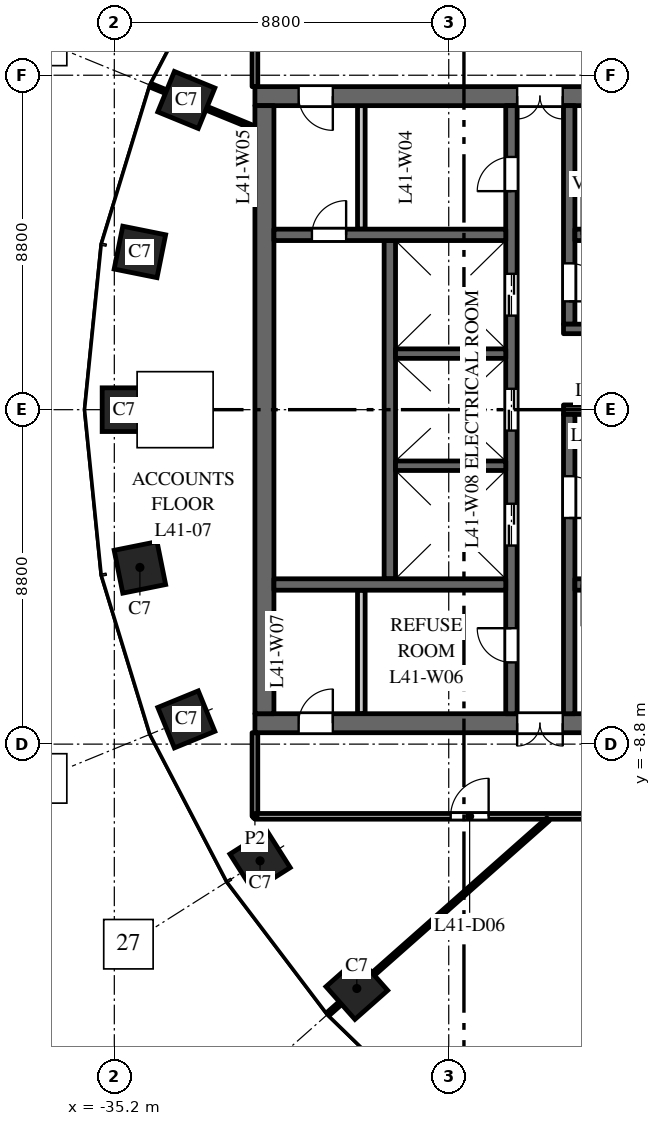
"""IFC4 building model, lengths in metres.
Left out: names, types, materials, properties, quantities, classifications, styles, units other than length and angle.
Written with IfcOpenShell. Run it as: python <this file> out.ifc"""

import sys

from ifc_helpers import new_model, si_unit, direction, frame, frame_2d, origin, origin_2d, place, context, subcontext, project, spatial, rectangle, extrude, element, fill, save


model = new_model("IFC4")
c1 = context("Model", 3, precision=1e-05, world=origin(), true_north=direction((0.0, 1.0)))
c2 = subcontext(c1, "Body", "Model", "MODEL_VIEW")
j1 = project(units=[si_unit("LENGTHUNIT", "METRE"), si_unit("PLANEANGLEUNIT", "RADIAN")], contexts=[c1])
p1 = place(None, origin())
s1 = spatial("IfcSite", under=j1, at=p1, CompositionType="ELEMENT")
p2 = place(p1, origin())
s2 = spatial("IfcBuilding", under=s1, at=p2, CompositionType="ELEMENT")
p3 = place(p2, frame((0.0, 0.0, 178.0)))
s3 = spatial("IfcBuildingStorey", under=s2, at=p3, CompositionType="ELEMENT", Elevation=178.0)
for number, where, z_axis, x_axis in (
    (1, (-33.305, 8.149, 0.0), (0.0, 0.0, 1.0), (-0.379, -0.925, 0.0)),
    (2, (-34.527, 4.151, 0.0), (0.0, 0.0, 1.0), (-0.197, -0.98, 0.0)),
    (3, (-34.945, 0.0, 0.0), (0.0, 0.0, 1.0), (0.0, -1.0, 0.0)),
    (4, (-34.527, -4.151, 0.0), (0.0, 0.0, 1.0), (0.197, -0.98, 0.0)),
    (5, (-33.305, -8.149, 0.0), (0.0, 0.0, 1.0), (0.379, -0.925, 0.0)),
    (6, (-31.365, -11.871, 0.0), (0.0, 0.0, 1.0), (0.535, -0.845, 0.0)),
    (7, (-28.819, -15.23, 0.0), (0.0, 0.0, 1.0), (0.663, -0.749, 0.0)),
):
    element("IfcColumn", number, at=place(p3, frame(where, z_axis=z_axis, x_axis=x_axis)), inside=s3, PredefinedType="COLUMN", context=c2, shape_type="SweptSolid", body=[
        extrude(rectangle(XDim=1.15, YDim=1.15, at=origin_2d()), origin(), (0.0, 0.0, 1.0), 4.0),
    ])
p4 = place(p3, frame((-16.5, 8.25, 0.0), z_axis=(0.0, 0.0, 1.0), x_axis=(-1.0, 0.0, 0.0)))
e8 = element("IfcWall", 8, at=p4, inside=s3, PredefinedType="SHEAR", context=c2, shape_type="SweptSolid", body=[
    extrude(rectangle(XDim=15.0, YDim=0.5, at=frame_2d((7.5, 0.0))), origin(), (0.0, 0.0, 1.0), 3.7),
])
p5 = place(p4, frame((6.9, 0.0, 0.0)))
e9 = element("IfcOpeningElement", 9, at=p5, cuts=e8, PredefinedType="OPENING", context=c2, shape_type="SweptSolid", body=[
    extrude(rectangle(XDim=1.2, YDim=2.1, at=frame_2d((0.6, 1.05))), frame((0.0, 0.26, 0.0), z_axis=(0.0, -1.0, 0.0), x_axis=(1.0, 0.0, 0.0)), (0.0, 0.0, 1.0), 0.52),
])
p6 = place(p4, frame((12.95, 0.0, 0.0)))
e10 = element("IfcOpeningElement", 10, at=p6, cuts=e8, PredefinedType="OPENING", context=c2, shape_type="SweptSolid", body=[
    extrude(rectangle(XDim=0.9, YDim=2.1, at=frame_2d((0.45, 1.05))), frame((0.0, 0.26, 0.0), z_axis=(0.0, -1.0, 0.0), x_axis=(1.0, 0.0, 0.0)), (0.0, 0.0, 1.0), 0.52),
])
p7 = place(p3, frame((-16.5, -8.25, 0.0), z_axis=(0.0, 0.0, 1.0), x_axis=(-1.0, 0.0, 0.0)))
e11 = element("IfcWall", 11, at=p7, inside=s3, PredefinedType="SHEAR", context=c2, shape_type="SweptSolid", body=[
    extrude(rectangle(XDim=15.0, YDim=0.5, at=frame_2d((7.5, 0.0))), origin(), (0.0, 0.0, 1.0), 3.7),
])
p8 = place(p7, frame((6.9, 0.0, 0.0)))
e12 = element("IfcOpeningElement", 12, at=p8, cuts=e11, PredefinedType="OPENING", context=c2, shape_type="SweptSolid", body=[
    extrude(rectangle(XDim=1.2, YDim=2.1, at=frame_2d((0.6, 1.05))), frame((0.0, 0.26, 0.0), z_axis=(0.0, -1.0, 0.0), x_axis=(1.0, 0.0, 0.0)), (0.0, 0.0, 1.0), 0.52),
])
p9 = place(p7, frame((12.95, 0.0, 0.0)))
e13 = element("IfcOpeningElement", 13, at=p9, cuts=e11, PredefinedType="OPENING", context=c2, shape_type="SweptSolid", body=[
    extrude(rectangle(XDim=0.9, YDim=2.1, at=frame_2d((0.45, 1.05))), frame((0.0, 0.26, 0.0), z_axis=(0.0, -1.0, 0.0), x_axis=(1.0, 0.0, 0.0)), (0.0, 0.0, 1.0), 0.52),
])
p10 = place(p3, frame((-27.95, -4.45, 0.0), z_axis=(0.0, 0.0, 1.0), x_axis=(0.0, 1.0, 0.0)))
e14 = element("IfcWall", 14, at=p10, inside=s3, PredefinedType="SHEAR", context=c2, shape_type="SweptSolid", body=[
    extrude(rectangle(XDim=8.9, YDim=0.3, at=frame_2d((4.45, 0.0))), origin(), (0.0, 0.0, 1.0), 3.7),
])
p11 = place(p3, frame((-24.75, -8.0, 0.0), z_axis=(0.0, 0.0, 1.0), x_axis=(0.0, 1.0, 0.0)))
e15 = element("IfcWall", 15, at=p11, inside=s3, PredefinedType="SHEAR", context=c2, shape_type="SweptSolid", body=[
    extrude(rectangle(XDim=16.0, YDim=0.3, at=frame_2d((8.0, 0.0))), origin(), (0.0, 0.0, 1.0), 3.7),
])
p12 = place(p11, frame((4.425, 0.0, 0.0)))
e16 = element("IfcOpeningElement", 16, at=p12, cuts=e15, PredefinedType="OPENING", context=c2, shape_type="SweptSolid", body=[
    extrude(rectangle(XDim=1.1, YDim=2.1, at=frame_2d((0.55, 1.05))), frame((0.0, 0.16, 0.0), z_axis=(0.0, -1.0, 0.0), x_axis=(1.0, 0.0, 0.0)), (0.0, 0.0, 1.0), 0.32),
])
p13 = place(p11, frame((7.45, 0.0, 0.0)))
e17 = element("IfcOpeningElement", 17, at=p13, cuts=e15, PredefinedType="OPENING", context=c2, shape_type="SweptSolid", body=[
    extrude(rectangle(XDim=1.1, YDim=2.1, at=frame_2d((0.55, 1.05))), frame((0.0, 0.16, 0.0), z_axis=(0.0, -1.0, 0.0), x_axis=(1.0, 0.0, 0.0)), (0.0, 0.0, 1.0), 0.32),
])
p14 = place(p11, frame((10.475, 0.0, 0.0)))
e18 = element("IfcOpeningElement", 18, at=p14, cuts=e15, PredefinedType="OPENING", context=c2, shape_type="SweptSolid", body=[
    extrude(rectangle(XDim=1.1, YDim=2.1, at=frame_2d((0.55, 1.05))), frame((0.0, 0.16, 0.0), z_axis=(0.0, -1.0, 0.0), x_axis=(1.0, 0.0, 0.0)), (0.0, 0.0, 1.0), 0.32),
])
p15 = place(p11, frame((13.75, 0.0, 0.0)))
e19 = element("IfcOpeningElement", 19, at=p15, cuts=e15, PredefinedType="OPENING", context=c2, shape_type="SweptSolid", body=[
    extrude(rectangle(XDim=0.9, YDim=2.1, at=frame_2d((0.45, 1.05))), frame((0.0, 0.16, 0.0), z_axis=(0.0, -1.0, 0.0), x_axis=(1.0, 0.0, 0.0)), (0.0, 0.0, 1.0), 0.32),
])
p16 = place(p11, frame((1.35, 0.0, 0.0)))
e20 = element("IfcOpeningElement", 20, at=p16, cuts=e15, PredefinedType="OPENING", context=c2, shape_type="SweptSolid", body=[
    extrude(rectangle(XDim=0.9, YDim=2.1, at=frame_2d((0.45, 1.05))), frame((0.0, 0.16, 0.0), z_axis=(0.0, -1.0, 0.0), x_axis=(1.0, 0.0, 0.0)), (0.0, 0.0, 1.0), 0.32),
])
p17 = place(p3, frame((-20.1, 0.0, 0.0), z_axis=(0.0, 0.0, 1.0), x_axis=(-1.0, 0.0, 0.0)))
e21 = element("IfcWall", 21, at=p17, inside=s3, PredefinedType="SHEAR", context=c2, shape_type="SweptSolid", body=[
    extrude(rectangle(XDim=3.28, YDim=0.25, at=frame_2d((1.64, 0.0))), origin(), (0.0, 0.0, 1.0), 3.7),
])
p18 = place(p3, frame((-31.25, -8.0, 0.0), z_axis=(0.0, 0.0, 1.0), x_axis=(0.0, 1.0, 0.0)))
e22 = element("IfcWall", 22, at=p18, inside=s3, PredefinedType="SHEAR", context=c2, shape_type="SweptSolid", body=[
    extrude(rectangle(XDim=16.0, YDim=0.5, at=frame_2d((8.0, 0.0))), origin(), (0.0, 0.0, 1.0), 3.7),
])
p19 = place(p3, frame((-24.9, 4.6, 0.0), z_axis=(0.0, 0.0, 1.0), x_axis=(-1.0, 0.0, 0.0)))
e23 = element("IfcWall", 23, at=p19, inside=s3, PredefinedType="SHEAR", context=c2, shape_type="SweptSolid", body=[
    extrude(rectangle(XDim=6.1, YDim=0.3, at=frame_2d((3.05, 0.0))), origin(), (0.0, 0.0, 1.0), 3.7),
])
p20 = place(p19, frame((4.2, 0.0, 0.0)))
e24 = element("IfcOpeningElement", 24, at=p20, cuts=e23, PredefinedType="OPENING", context=c2, shape_type="SweptSolid", body=[
    extrude(rectangle(XDim=0.9, YDim=2.1, at=frame_2d((0.45, 1.05))), frame((0.0, 0.16, 0.0), z_axis=(0.0, -1.0, 0.0), x_axis=(1.0, 0.0, 0.0)), (0.0, 0.0, 1.0), 0.32),
])
for number, where, z_axis, x_axis in (
    (25, (-28.7, 4.75, 0.0), (0.0, 0.0, 1.0), (0.0, 1.0, 0.0)),
    (26, (-28.7, -8.0, 0.0), (0.0, 0.0, 1.0), (0.0, 1.0, 0.0)),
):
    element("IfcWall", number, at=place(p3, frame(where, z_axis=z_axis, x_axis=x_axis)), inside=s3, PredefinedType="PARTITIONING", context=c2, shape_type="SweptSolid", body=[
        extrude(rectangle(XDim=3.25, YDim=0.2, at=frame_2d((1.625, 0.0))), origin(), (0.0, 0.0, 1.0), 3.7),
    ])
p21 = place(p3, frame((-24.9, -4.6, 0.0), z_axis=(0.0, 0.0, 1.0), x_axis=(-1.0, 0.0, 0.0)))
e27 = element("IfcWall", 27, at=p21, inside=s3, PredefinedType="SHEAR", context=c2, shape_type="SweptSolid", body=[
    extrude(rectangle(XDim=6.1, YDim=0.3, at=frame_2d((3.05, 0.0))), origin(), (0.0, 0.0, 1.0), 3.7),
])
for number, where, z_axis, x_axis in (
    (28, (-24.9, -1.475, 0.0), (0.0, 0.0, 1.0), (-1.0, 0.0, 0.0)),
    (29, (-24.9, 1.475, 0.0), (0.0, 0.0, 1.0), (-1.0, 0.0, 0.0)),
):
    element("IfcWall", number, at=place(p3, frame(where, z_axis=z_axis, x_axis=x_axis)), inside=s3, PredefinedType="SHEAR", context=c2, shape_type="SweptSolid", body=[
        extrude(rectangle(XDim=2.9, YDim=0.25, at=frame_2d((1.45, 0.0))), origin(), (0.0, 0.0, 1.0), 3.7),
    ])
p22 = place(p3, frame((-23.23, 2.25, 0.0), z_axis=(0.0, 0.0, 1.0), x_axis=(0.0, 1.0, 0.0)))
e30 = element("IfcWall", 30, at=p22, inside=s3, PredefinedType="SHEAR", context=c2, shape_type="SweptSolid", body=[
    extrude(rectangle(XDim=5.75, YDim=0.3, at=frame_2d((2.875, 0.0))), origin(), (0.0, 0.0, 1.0), 3.7),
])
p23 = place(p22, frame((0.6, 0.0, 0.0)))
e31 = element("IfcOpeningElement", 31, at=p23, cuts=e30, PredefinedType="OPENING", context=c2, shape_type="SweptSolid", body=[
    extrude(rectangle(XDim=1.0, YDim=2.1, at=frame_2d((0.5, 1.05))), frame((0.0, 0.16, 0.0), z_axis=(0.0, -1.0, 0.0), x_axis=(1.0, 0.0, 0.0)), (0.0, 0.0, 1.0), 0.32),
])
p24 = place(p3, frame((-23.23, -8.0, 0.0), z_axis=(0.0, 0.0, 1.0), x_axis=(0.0, 1.0, 0.0)))
e32 = element("IfcWall", 32, at=p24, inside=s3, PredefinedType="SHEAR", context=c2, shape_type="SweptSolid", body=[
    extrude(rectangle(XDim=7.875, YDim=0.3, at=frame_2d((3.938, 0.0))), origin(), (0.0, 0.0, 1.0), 3.7),
])
p25 = place(p24, frame((5.15, 0.0, 0.0)))
e33 = element("IfcOpeningElement", 33, at=p25, cuts=e32, PredefinedType="OPENING", context=c2, shape_type="SweptSolid", body=[
    extrude(rectangle(XDim=1.1, YDim=2.1, at=frame_2d((0.55, 1.05))), frame((0.0, 0.16, 0.0), z_axis=(0.0, -1.0, 0.0), x_axis=(1.0, 0.0, 0.0)), (0.0, 0.0, 1.0), 0.32),
])
p26 = place(p3, frame((-16.9, 4.6, 0.0), z_axis=(0.0, 0.0, 1.0), x_axis=(-1.0, 0.0, 0.0)))
e34 = element("IfcWall", 34, at=p26, inside=s3, PredefinedType="SHEAR", context=c2, shape_type="SweptSolid", body=[
    extrude(rectangle(XDim=6.18, YDim=0.3, at=frame_2d((3.09, 0.0))), origin(), (0.0, 0.0, 1.0), 3.7),
])
p27 = place(p26, frame((4.9, 0.0, 0.0)))
e35 = element("IfcOpeningElement", 35, at=p27, cuts=e34, PredefinedType="OPENING", context=c2, shape_type="SweptSolid", body=[
    extrude(rectangle(XDim=1.1, YDim=2.1, at=frame_2d((0.55, 1.05))), frame((0.0, 0.16, 0.0), z_axis=(0.0, -1.0, 0.0), x_axis=(1.0, 0.0, 0.0)), (0.0, 0.0, 1.0), 0.32),
])
p28 = place(p3, frame((-16.9, -4.6, 0.0), z_axis=(0.0, 0.0, 1.0), x_axis=(-1.0, 0.0, 0.0)))
e36 = element("IfcWall", 36, at=p28, inside=s3, PredefinedType="SHEAR", context=c2, shape_type="SweptSolid", body=[
    extrude(rectangle(XDim=6.18, YDim=0.3, at=frame_2d((3.09, 0.0))), origin(), (0.0, 0.0, 1.0), 3.7),
])
p29 = place(p28, frame((4.9, 0.0, 0.0)))
e37 = element("IfcOpeningElement", 37, at=p29, cuts=e36, PredefinedType="OPENING", context=c2, shape_type="SweptSolid", body=[
    extrude(rectangle(XDim=1.1, YDim=2.1, at=frame_2d((0.55, 1.05))), frame((0.0, 0.16, 0.0), z_axis=(0.0, -1.0, 0.0), x_axis=(1.0, 0.0, 0.0)), (0.0, 0.0, 1.0), 0.32),
])
p30 = place(p3, frame((-20.85, 2.125, 0.0), z_axis=(0.0, 0.0, 1.0), x_axis=(-1.0, 0.0, 0.0)))
e38 = element("IfcWall", 38, at=p30, inside=s3, PredefinedType="SHEAR", context=c2, shape_type="SweptSolid", body=[
    extrude(rectangle(XDim=2.53, YDim=0.25, at=frame_2d((1.265, 0.0))), origin(), (0.0, 0.0, 1.0), 3.7),
])
p31 = place(p3, frame((-34.234, 8.53, 0.0), z_axis=(0.0, 0.0, 1.0), x_axis=(0.925344112436, -0.379128307542, 0.0)))
e39 = element("IfcWall", 39, at=p31, inside=s3, PredefinedType="PARTITIONING", context=c2, shape_type="SweptSolid", body=[
    extrude(rectangle(XDim=2.954, YDim=0.1, at=frame_2d((1.477, 0.0))), origin(), (0.0, 0.0, 1.0), 2.9),
])
p32 = place(p3, frame((-31.5, -10.7, 0.0), z_axis=(0.0, 0.0, 1.0), x_axis=(0.0, 1.0, 0.0)))
e40 = element("IfcWall", 40, at=p32, inside=s3, PredefinedType="PARTITIONING", context=c2, shape_type="SweptSolid", body=[
    extrude(rectangle(XDim=2.2, YDim=0.15, at=frame_2d((1.1, 0.0))), origin(), (0.0, 0.0, 1.0), 3.7),
])
p33 = place(p3, frame((-31.5, -10.7, 0.0), z_axis=(0.0, 0.0, 1.0), x_axis=(1.0, 0.0, 0.0)))
e41 = element("IfcWall", 41, at=p33, inside=s3, PredefinedType="PARTITIONING", context=c2, shape_type="SweptSolid", body=[
    extrude(rectangle(XDim=15.0, YDim=0.15, at=frame_2d((7.5, 0.0))), origin(), (0.0, 0.0, 1.0), 3.1),
])
p34 = place(p33, frame((5.15, 0.0, 0.0)))
e42 = element("IfcOpeningElement", 42, at=p34, cuts=e41, PredefinedType="OPENING", context=c2, shape_type="SweptSolid", body=[
    extrude(rectangle(XDim=1.0, YDim=2.1, at=frame_2d((0.5, 1.05))), frame((0.0, 0.085, 0.0), z_axis=(0.0, -1.0, 0.0), x_axis=(1.0, 0.0, 0.0)), (0.0, 0.0, 1.0), 0.17),
])
p35 = place(p33, frame((9.948, 0.0, 0.0)))
e43 = element("IfcOpeningElement", 43, at=p35, cuts=e41, PredefinedType="OPENING", context=c2, shape_type="SweptSolid", body=[
    extrude(rectangle(XDim=1.0, YDim=2.1, at=frame_2d((0.5, 1.05))), frame((0.0, 0.085, 0.0), z_axis=(0.0, -1.0, 0.0), x_axis=(1.0, 0.0, 0.0)), (0.0, 0.0, 1.0), 0.17),
])
p36 = place(p3, frame((-31.5, 8.5, 0.0), z_axis=(0.0, 0.0, 1.0), x_axis=(0.0, 1.0, 0.0)))
e44 = element("IfcWall", 44, at=p36, inside=s3, PredefinedType="PARTITIONING", context=c2, shape_type="SweptSolid", body=[
    extrude(rectangle(XDim=2.2, YDim=0.15, at=frame_2d((1.1, 0.0))), origin(), (0.0, 0.0, 1.0), 3.7),
])
p37 = place(p3, frame((-29.569, -15.895, 0.0), z_axis=(0.0, 0.0, 1.0), x_axis=(0.748985701008, 0.662586160198, 0.0)))
e45 = element("IfcWall", 45, at=p37, inside=s3, PredefinedType="PARTITIONING", context=c2, shape_type="SweptSolid", body=[
    extrude(rectangle(XDim=7.723, YDim=0.1, at=frame_2d((3.861, 0.0))), origin(), (0.0, 0.0, 1.0), 2.9),
])
p38 = place(p12, origin())
e46 = element("IfcDoor", 46, at=p38, inside=s3, OperationType="DOUBLE_DOOR_SLIDING", PredefinedType="DOOR", context=c2, shape_type="SweptSolid", body=[
    extrude(rectangle(XDim=1.1, YDim=2.1, at=frame_2d((0.55, 1.05))), frame((0.0, 0.025, 0.0), z_axis=(0.0, -1.0, 0.0), x_axis=(1.0, 0.0, 0.0)), (0.0, 0.0, 1.0), 0.05),
])
fill(e16, e46)
p39 = place(p13, origin())
e47 = element("IfcDoor", 47, at=p39, inside=s3, OperationType="DOUBLE_DOOR_SLIDING", PredefinedType="DOOR", context=c2, shape_type="SweptSolid", body=[
    extrude(rectangle(XDim=1.1, YDim=2.1, at=frame_2d((0.55, 1.05))), frame((0.0, 0.025, 0.0), z_axis=(0.0, -1.0, 0.0), x_axis=(1.0, 0.0, 0.0)), (0.0, 0.0, 1.0), 0.05),
])
fill(e17, e47)
p40 = place(p14, origin())
e48 = element("IfcDoor", 48, at=p40, inside=s3, OperationType="DOUBLE_DOOR_SLIDING", PredefinedType="DOOR", context=c2, shape_type="SweptSolid", body=[
    extrude(rectangle(XDim=1.1, YDim=2.1, at=frame_2d((0.55, 1.05))), frame((0.0, 0.025, 0.0), z_axis=(0.0, -1.0, 0.0), x_axis=(1.0, 0.0, 0.0)), (0.0, 0.0, 1.0), 0.05),
])
fill(e18, e48)
p41 = place(p27, origin())
e49 = element("IfcDoor", 49, at=p41, inside=s3, OperationType="SINGLE_SWING_RIGHT", PredefinedType="DOOR", context=c2, shape_type="SweptSolid", body=[
    extrude(rectangle(XDim=1.1, YDim=2.1, at=frame_2d((0.55, 1.05))), frame((0.0, 0.025, 0.0), z_axis=(0.0, -1.0, 0.0), x_axis=(1.0, 0.0, 0.0)), (0.0, 0.0, 1.0), 0.05),
])
fill(e35, e49)
p42 = place(p29, origin())
e50 = element("IfcDoor", 50, at=p42, inside=s3, OperationType="SINGLE_SWING_LEFT", PredefinedType="DOOR", context=c2, shape_type="SweptSolid", body=[
    extrude(rectangle(XDim=1.1, YDim=2.1, at=frame_2d((0.55, 1.05))), frame((0.0, 0.025, 0.0), z_axis=(0.0, -1.0, 0.0), x_axis=(1.0, 0.0, 0.0)), (0.0, 0.0, 1.0), 0.05),
])
fill(e37, e50)
p43 = place(p25, origin())
e51 = element("IfcDoor", 51, at=p43, inside=s3, OperationType="SINGLE_SWING_LEFT", PredefinedType="DOOR", context=c2, shape_type="SweptSolid", body=[
    extrude(rectangle(XDim=1.1, YDim=2.1, at=frame_2d((0.55, 1.05))), frame((0.0, 0.025, 0.0), z_axis=(0.0, -1.0, 0.0), x_axis=(1.0, 0.0, 0.0)), (0.0, 0.0, 1.0), 0.05),
])
fill(e33, e51)
p44 = place(p23, origin())
e52 = element("IfcDoor", 52, at=p44, inside=s3, OperationType="SINGLE_SWING_LEFT", PredefinedType="DOOR", context=c2, shape_type="SweptSolid", body=[
    extrude(rectangle(XDim=1.0, YDim=2.1, at=frame_2d((0.5, 1.05))), frame((0.0, 0.025, 0.0), z_axis=(0.0, -1.0, 0.0), x_axis=(1.0, 0.0, 0.0)), (0.0, 0.0, 1.0), 0.05),
])
fill(e31, e52)
p45 = place(p5, origin())
e53 = element("IfcDoor", 53, at=p45, inside=s3, OperationType="DOUBLE_DOOR_DOUBLE_SWING", PredefinedType="DOOR", context=c2, shape_type="SweptSolid", body=[
    extrude(rectangle(XDim=1.2, YDim=2.1, at=frame_2d((0.6, 1.05))), frame((0.0, 0.025, 0.0), z_axis=(0.0, -1.0, 0.0), x_axis=(1.0, 0.0, 0.0)), (0.0, 0.0, 1.0), 0.05),
])
fill(e9, e53)
p46 = place(p8, origin())
e54 = element("IfcDoor", 54, at=p46, inside=s3, OperationType="DOUBLE_DOOR_DOUBLE_SWING", PredefinedType="DOOR", context=c2, shape_type="SweptSolid", body=[
    extrude(rectangle(XDim=1.2, YDim=2.1, at=frame_2d((0.6, 1.05))), frame((0.0, 0.025, 0.0), z_axis=(0.0, -1.0, 0.0), x_axis=(1.0, 0.0, 0.0)), (0.0, 0.0, 1.0), 0.05),
])
fill(e12, e54)
p47 = place(p15, origin())
e55 = element("IfcDoor", 55, at=p47, inside=s3, OperationType="SINGLE_SWING_RIGHT", PredefinedType="DOOR", context=c2, shape_type="SweptSolid", body=[
    extrude(rectangle(XDim=0.9, YDim=2.1, at=frame_2d((0.45, 1.05))), frame((0.0, 0.025, 0.0), z_axis=(0.0, -1.0, 0.0), x_axis=(1.0, 0.0, 0.0)), (0.0, 0.0, 1.0), 0.05),
])
fill(e19, e55)
p48 = place(p6, origin())
e56 = element("IfcDoor", 56, at=p48, inside=s3, OperationType="SINGLE_SWING_RIGHT", PredefinedType="DOOR", context=c2, shape_type="SweptSolid", body=[
    extrude(rectangle(XDim=0.9, YDim=2.1, at=frame_2d((0.45, 1.05))), frame((0.0, 0.025, 0.0), z_axis=(0.0, -1.0, 0.0), x_axis=(1.0, 0.0, 0.0)), (0.0, 0.0, 1.0), 0.05),
])
fill(e10, e56)
p49 = place(p16, origin())
e57 = element("IfcDoor", 57, at=p49, inside=s3, OperationType="SINGLE_SWING_LEFT", PredefinedType="DOOR", context=c2, shape_type="SweptSolid", body=[
    extrude(rectangle(XDim=0.9, YDim=2.1, at=frame_2d((0.45, 1.05))), frame((0.0, 0.025, 0.0), z_axis=(0.0, -1.0, 0.0), x_axis=(1.0, 0.0, 0.0)), (0.0, 0.0, 1.0), 0.05),
])
fill(e20, e57)
p50 = place(p9, origin())
e58 = element("IfcDoor", 58, at=p50, inside=s3, OperationType="SINGLE_SWING_LEFT", PredefinedType="DOOR", context=c2, shape_type="SweptSolid", body=[
    extrude(rectangle(XDim=0.9, YDim=2.1, at=frame_2d((0.45, 1.05))), frame((0.0, 0.025, 0.0), z_axis=(0.0, -1.0, 0.0), x_axis=(1.0, 0.0, 0.0)), (0.0, 0.0, 1.0), 0.05),
])
fill(e13, e58)
p51 = place(p20, origin())
e59 = element("IfcDoor", 59, at=p51, inside=s3, OperationType="SINGLE_SWING_LEFT", PredefinedType="DOOR", context=c2, shape_type="SweptSolid", body=[
    extrude(rectangle(XDim=0.9, YDim=2.1, at=frame_2d((0.45, 1.05))), frame((0.0, 0.025, 0.0), z_axis=(0.0, -1.0, 0.0), x_axis=(1.0, 0.0, 0.0)), (0.0, 0.0, 1.0), 0.05),
])
fill(e24, e59)
p52 = place(p34, origin())
e60 = element("IfcDoor", 60, at=p52, inside=s3, OperationType="SINGLE_SWING_RIGHT", PredefinedType="DOOR", context=c2, shape_type="SweptSolid", body=[
    extrude(rectangle(XDim=1.0, YDim=2.1, at=frame_2d((0.5, 1.05))), frame((0.0, 0.025, 0.0), z_axis=(0.0, -1.0, 0.0), x_axis=(1.0, 0.0, 0.0)), (0.0, 0.0, 1.0), 0.05),
])
fill(e42, e60)
save(model, sys.argv[1])
